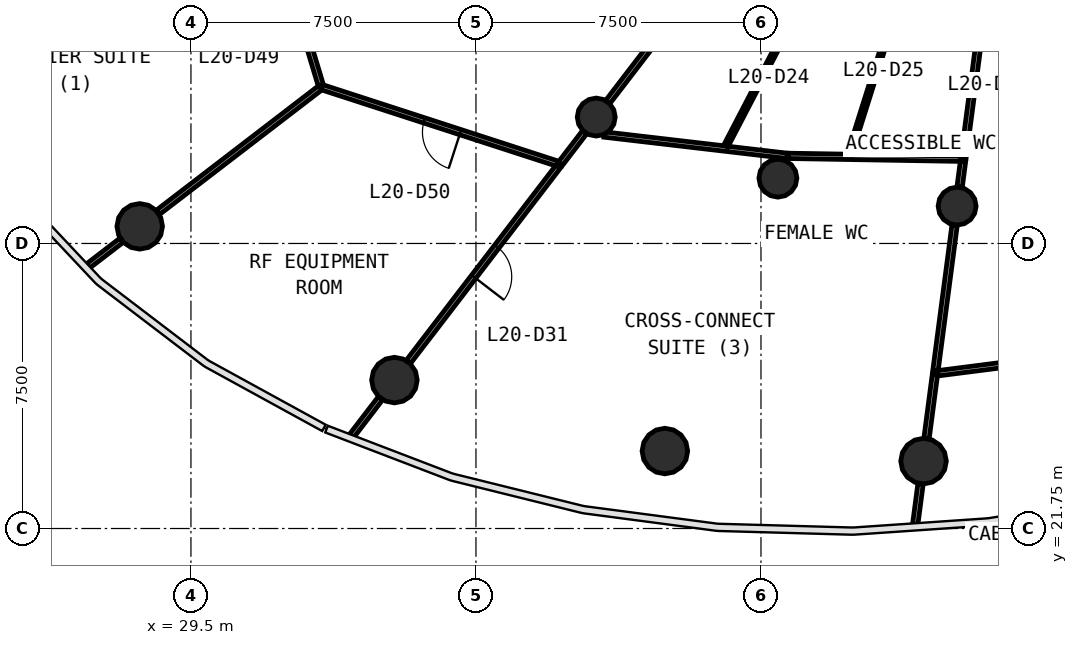
"""IFC4 building model, lengths in metres.
Left out: names, types, materials, properties, quantities, classifications, styles, units other than length and angle.
Written with IfcOpenShell. Run it as: python <this file> out.ifc"""

import sys

from ifc_helpers import new_model, si_unit, direction, frame, frame_2d, origin, origin_2d, place, context, subcontext, project, spatial, rectangle, circle, extrude, source, transform, mapped, element, fill, save


model = new_model("IFC4")
c1 = context("Model", 3, precision=1e-05, world=origin(), true_north=direction((0.0, 1.0)))
c2 = subcontext(c1, "Body", "Model", "MODEL_VIEW")
j1 = project(units=[si_unit("LENGTHUNIT", "METRE"), si_unit("PLANEANGLEUNIT", "RADIAN")], contexts=[c1])
p1 = place(None, origin())
s1 = spatial("IfcSite", under=j1, at=p1, CompositionType="ELEMENT")
p2 = place(p1, origin())
s2 = spatial("IfcBuilding", under=s1, at=p2, CompositionType="ELEMENT")
p3 = place(p2, frame((0.0, 0.0, 88.0)))
s3 = spatial("IfcBuildingStorey", under=s2, at=p3, CompositionType="ELEMENT", Elevation=88.0)
m1 = source(origin(), c2, "Body", "SweptSolid", [
    extrude(circle(Radius=0.6, at=origin_2d()), origin(), (0.0, 0.0, 1.0), 4.1),
])
for number, where, z_axis, x_axis in (
    (1, (28.152, 29.701, 0.0), (0.0, 0.0, 1.0), (1.0, 0.0, 0.0)),
    (2, (34.854, 25.655, 0.0), (0.0, 0.0, 1.0), (1.0, 0.0, 0.0)),
    (3, (41.971, 23.788, 0.0), (0.0, 0.0, 1.0), (1.0, 0.0, 0.0)),
    (4, (48.778, 23.523, 0.0), (0.0, 0.0, 1.0), (1.0, 0.0, 0.0)),
):
    element("IfcColumn", number, at=place(p3, frame(where, z_axis=z_axis, x_axis=x_axis)), inside=s3, PredefinedType="COLUMN", context=c2, shape_type="MappedRepresentation", body=[
        mapped(m1, transform((0.0, 0.0, 0.0), scale=1.0)),
    ])
m2 = source(origin(), c2, "Body", "SweptSolid", [
    extrude(circle(Radius=0.5, at=origin_2d()), origin(), (0.0, 0.0, 1.0), 4.1),
])
for number, where, z_axis, x_axis in (
    (5, (40.165, 32.576, 0.0), (0.0, 0.0, 1.0), (1.0, 0.0, 0.0)),
    (6, (44.945, 30.969, 0.0), (0.0, 0.0, 1.0), (1.0, 0.0, 0.0)),
    (7, (49.661, 30.233, 0.0), (0.0, 0.0, 1.0), (1.0, 0.0, 0.0)),
):
    element("IfcColumn", number, at=place(p3, frame(where, z_axis=z_axis, x_axis=x_axis)), inside=s3, PredefinedType="COLUMN", context=c2, shape_type="MappedRepresentation", body=[
        mapped(m2, transform((0.0, 0.0, 0.0), scale=1.0)),
    ])
p4 = place(p3, frame((39.208, 31.33, 0.0), z_axis=(0.0, 0.0, 1.0), x_axis=(-0.951175578821, 0.308650317115, 0.0)))
e8 = element("IfcWall", 8, at=p4, inside=s3, PredefinedType="PARTITIONING", context=c2, shape_type="SweptSolid", body=[
    extrude(rectangle(XDim=6.601, YDim=0.14, at=frame_2d((3.3, 0.0))), origin(), (0.0, 0.0, 1.0), 2.9),
])
p5 = place(p4, frame((2.751, 0.0, 0.0)))
e9 = element("IfcOpeningElement", 9, at=p5, cuts=e8, PredefinedType="OPENING", context=c2, shape_type="SweptSolid", body=[
    extrude(rectangle(XDim=1.0, YDim=2.1, at=frame_2d((0.5, 1.05))), frame((0.0, 0.08, 0.0), z_axis=(0.0, -1.0, 0.0), x_axis=(1.0, 0.0, 0.0)), (0.0, 0.0, 1.0), 0.16),
])
p6 = place(p3, frame((39.163, 31.271, 0.0), z_axis=(0.0, 0.0, 1.0), x_axis=(-0.608755308598, -0.79335803661, 0.0)))
e10 = element("IfcWall", 10, at=p6, inside=s3, PredefinedType="PARTITIONING", context=c2, shape_type="SweptSolid", body=[
    extrude(rectangle(XDim=6.474, YDim=0.14, at=frame_2d((3.237, 0.0))), origin(), (0.0, 0.0, 1.0), 2.9),
])
p7 = place(p6, frame((2.65, 0.0, 0.0)))
e11 = element("IfcOpeningElement", 11, at=p7, cuts=e10, PredefinedType="OPENING", context=c2, shape_type="SweptSolid", body=[
    extrude(rectangle(XDim=1.0, YDim=2.1, at=frame_2d((0.5, 1.05))), frame((0.0, 0.08, 0.0), z_axis=(0.0, -1.0, 0.0), x_axis=(1.0, 0.0, 0.0)), (0.0, 0.0, 1.0), 0.16),
])
p8 = place(p3, frame((32.921, 33.396, 0.0), z_axis=(0.0, 0.0, 1.0), x_axis=(-0.287768141446, 0.957700107951, 0.0)))
e12 = element("IfcWall", 12, at=p8, inside=s3, PredefinedType="PARTITIONING", context=c2, shape_type="SweptSolid", body=[
    extrude(rectangle(XDim=5.809, YDim=0.14, at=frame_2d((2.904, 0.0))), origin(), (0.0, 0.0, 1.0), 2.9),
])
p9 = place(p8, frame((2.359, 0.0, 0.0)))
e13 = element("IfcOpeningElement", 13, at=p9, cuts=e12, PredefinedType="OPENING", context=c2, shape_type="SweptSolid", body=[
    extrude(rectangle(XDim=1.0, YDim=2.1, at=frame_2d((0.5, 1.05))), frame((0.0, 0.08, 0.0), z_axis=(0.0, -1.0, 0.0), x_axis=(1.0, 0.0, 0.0)), (0.0, 0.0, 1.0), 0.16),
])
p10 = place(p3, frame((54.823, 26.56, 0.0), z_axis=(0.0, 0.0, 1.0), x_axis=(-0.99190429121, -0.126987704445, 0.0)))
e14 = element("IfcWall", 14, at=p10, inside=s3, PredefinedType="PARTITIONING", context=c2, shape_type="SweptSolid", body=[
    extrude(rectangle(XDim=5.789, YDim=0.14, at=frame_2d((2.895, 0.0))), origin(), (0.0, 0.0, 1.0), 2.9),
])
p11 = place(p10, frame((2.339, 0.0, 0.0)))
e15 = element("IfcOpeningElement", 15, at=p11, cuts=e14, PredefinedType="OPENING", context=c2, shape_type="SweptSolid", body=[
    extrude(rectangle(XDim=1.0, YDim=2.1, at=frame_2d((0.5, 1.05))), frame((0.0, 0.08, 0.0), z_axis=(0.0, -1.0, 0.0), x_axis=(1.0, 0.0, 0.0)), (0.0, 0.0, 1.0), 0.16),
])
p12 = place(p3, frame((32.906, 33.349, 0.0), z_axis=(0.0, 0.0, 1.0), x_axis=(-0.793372937326, -0.608735888805, 0.0)))
e16 = element("IfcWall", 16, at=p12, inside=s3, PredefinedType="PARTITIONING", context=c2, shape_type="SweptSolid", body=[
    extrude(rectangle(XDim=5.388, YDim=0.14, at=frame_2d((2.694, 0.0))), origin(), (0.0, 0.0, 1.0), 2.9),
])
p13 = place(p3, frame((40.374, 32.117, 0.0), z_axis=(0.0, 0.0, 1.0), x_axis=(0.993268355234, -0.115835980988, 0.0)))
e17 = element("IfcWall", 17, at=p13, inside=s3, PredefinedType="PARTITIONING", context=c2, shape_type="SweptSolid", body=[
    extrude(rectangle(XDim=4.848, YDim=0.14, at=frame_2d((2.424, 0.0))), origin(), (0.0, 0.0, 1.0), 2.9),
])
p14 = place(p3, frame((45.219, 31.555, 0.0), z_axis=(0.0, 0.0, 1.0), x_axis=(0.999861551783, -0.016639629386, 0.0)))
e18 = element("IfcWall", 18, at=p14, inside=s3, PredefinedType="PARTITIONING", context=c2, shape_type="SweptSolid", body=[
    extrude(rectangle(XDim=4.607, YDim=0.14, at=frame_2d((2.304, 0.0))), origin(), (0.0, 0.0, 1.0), 2.9),
])
p15 = place(p3, frame((50.356, 35.51, 0.0), z_axis=(0.0, 0.0, 1.0), x_axis=(-0.130531181342, -0.991444204531, 0.0)))
e19 = element("IfcWall", 19, at=p15, inside=s3, PredefinedType="PARTITIONING", context=c2, shape_type="SweptSolid", body=[
    extrude(rectangle(XDim=4.036, YDim=0.14, at=frame_2d((2.018, 0.0))), origin(), (0.0, 0.0, 1.0), 2.9),
])
p16 = place(p3, frame((49.595, 29.733, 0.0), z_axis=(0.0, 0.0, 1.0), x_axis=(-0.130510017613, -0.991446990667, 0.0)))
e20 = element("IfcWall", 20, at=p16, inside=s3, PredefinedType="PARTITIONING", context=c2, shape_type="SweptSolid", body=[
    extrude(rectangle(XDim=3.869, YDim=0.14, at=frame_2d((1.934, 0.0))), origin(), (0.0, 0.0, 1.0), 2.9),
])
p17 = place(p3, frame((42.416, 35.51, 0.0), z_axis=(0.0, 0.0, 1.0), x_axis=(-0.60874605662, -0.793365135703, 0.0)))
e21 = element("IfcWall", 21, at=p17, inside=s3, PredefinedType="PARTITIONING", context=c2, shape_type="SweptSolid", body=[
    extrude(rectangle(XDim=3.194, YDim=0.14, at=frame_2d((1.597, 0.0))), origin(), (0.0, 0.0, 1.0), 2.9),
])
p18 = place(p3, frame((49.077, 25.796, 0.0), z_axis=(0.0, 0.0, 1.0), x_axis=(-0.130476963779, -0.991451341178, 0.0)))
e22 = element("IfcWall", 22, at=p18, inside=s3, PredefinedType="PARTITIONING", context=c2, shape_type="SweptSolid", body=[
    extrude(rectangle(XDim=1.688, YDim=0.14, at=frame_2d((0.844, 0.0))), origin(), (0.0, 0.0, 1.0), 2.9),
])
p19 = place(p3, frame((34.486, 25.176, 0.0), z_axis=(0.0, 0.0, 1.0), x_axis=(-0.608646134538, -0.793441795541, 0.0)))
e23 = element("IfcWall", 23, at=p19, inside=s3, PredefinedType="PARTITIONING", context=c2, shape_type="SweptSolid", body=[
    extrude(rectangle(XDim=1.242, YDim=0.14, at=frame_2d((0.621, 0.0))), origin(), (0.0, 0.0, 1.0), 2.9),
])
p20 = place(p3, frame((27.672, 29.333, 0.0), z_axis=(0.0, 0.0, 1.0), x_axis=(-0.793279591373, -0.608857528418, 0.0)))
e24 = element("IfcWall", 24, at=p20, inside=s3, PredefinedType="PARTITIONING", context=c2, shape_type="SweptSolid", body=[
    extrude(rectangle(XDim=1.107, YDim=0.14, at=frame_2d((0.553, 0.0))), origin(), (0.0, 0.0, 1.0), 2.9),
])
p21 = place(p3, frame((48.699, 22.924, 0.0), z_axis=(0.0, 0.0, 1.0), x_axis=(-0.130596008599, -0.991435667372, 0.0)))
e25 = element("IfcWall", 25, at=p21, inside=s3, PredefinedType="PARTITIONING", context=c2, shape_type="SweptSolid", body=[
    extrude(rectangle(XDim=1.071, YDim=0.14, at=frame_2d((0.536, 0.0))), origin(), (0.0, 0.0, 1.0), 2.9),
])
p22 = place(p3, frame((39.858, 32.176, 0.0), z_axis=(0.0, 0.0, 1.0), x_axis=(-0.608777438842, -0.793341055258, 0.0)))
e26 = element("IfcWall", 26, at=p22, inside=s3, PredefinedType="PARTITIONING", context=c2, shape_type="SweptSolid", body=[
    extrude(rectangle(XDim=1.037, YDim=0.14, at=frame_2d((0.519, 0.0))), origin(), (0.0, 0.0, 1.0), 2.9),
])
p23 = place(p3, frame((49.816, 31.409, 0.0), z_axis=(0.0, 0.0, 1.0), x_axis=(-0.130380387554, -0.991464046015, 0.0)))
e27 = element("IfcWall", 27, at=p23, inside=s3, PredefinedType="PARTITIONING", context=c2, shape_type="SweptSolid", body=[
    extrude(rectangle(XDim=0.682, YDim=0.14, at=frame_2d((0.341, 0.0))), origin(), (0.0, 0.0, 1.0), 2.9),
])
p24 = place(p3, frame((45.498, 35.51, 0.0), z_axis=(0.0, 0.0, 1.0), x_axis=(-0.461756753262, -0.887006595701, 0.0)))
e28 = element("IfcWall", 28, at=p24, inside=s3, PredefinedType="PARTITIONING", context=c2, shape_type="SweptSolid", body=[
    extrude(rectangle(XDim=4.166, YDim=0.12, at=frame_2d((2.083, 0.0))), origin(), (0.0, 0.0, 1.0), 2.9),
])
p25 = place(p3, frame((48.062, 35.51, 0.0), z_axis=(0.0, 0.0, 1.0), x_axis=(-0.300721111257, -0.953712122836, 0.0)))
e29 = element("IfcWall", 29, at=p25, inside=s3, PredefinedType="PARTITIONING", context=c2, shape_type="SweptSolid", body=[
    extrude(rectangle(XDim=4.102, YDim=0.12, at=frame_2d((2.051, 0.0))), origin(), (0.0, 0.0, 1.0), 2.9),
])
m3 = source(origin(), c2, "Body", "SweptSolid", [
    extrude(rectangle(XDim=1.0, YDim=2.1, at=frame_2d((0.5, 1.05))), frame((0.0, 0.025, 0.0), z_axis=(0.0, -1.0, 0.0), x_axis=(1.0, 0.0, 0.0)), (0.0, 0.0, 1.0), 0.05),
])
p26 = place(p7, origin())
e30 = element("IfcDoor", 30, at=p26, inside=s3, OperationType="SINGLE_SWING_RIGHT", PredefinedType="DOOR", context=c2, shape_type="MappedRepresentation", body=[
    mapped(m3, transform((0.0, 0.0, 0.0), scale=1.0)),
])
fill(e11, e30)
p27 = place(p5, origin())
e31 = element("IfcDoor", 31, at=p27, inside=s3, OperationType="SINGLE_SWING_LEFT", PredefinedType="DOOR", context=c2, shape_type="MappedRepresentation", body=[
    mapped(m3, transform((0.0, 0.0, 0.0), scale=1.0)),
])
fill(e9, e31)
save(model, sys.argv[1])
